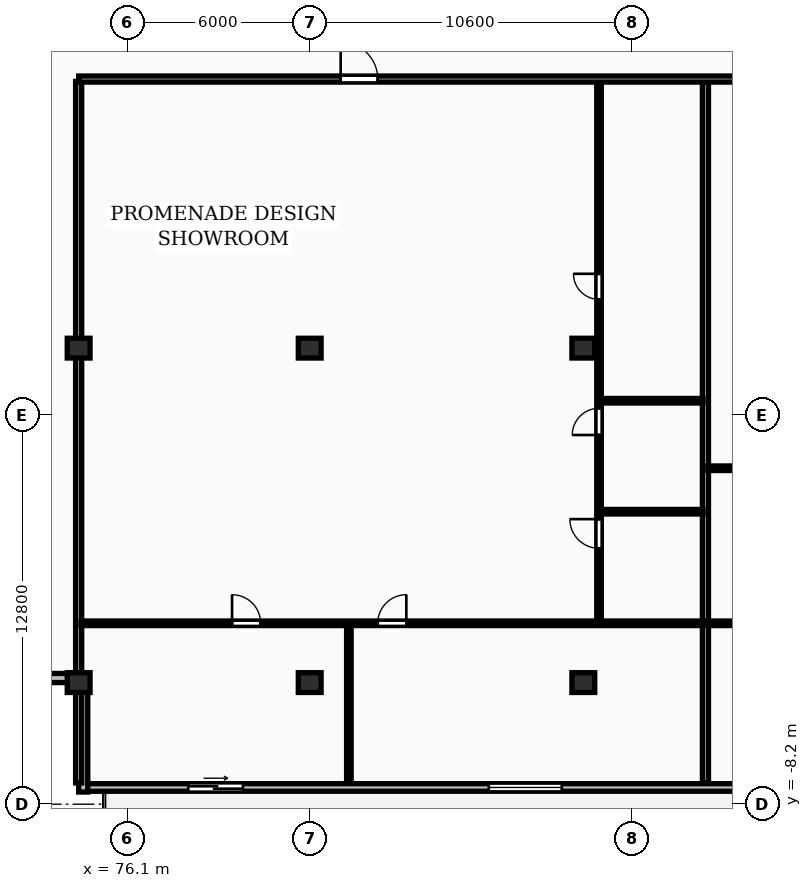
"""IFC4 building model, lengths in metres.
Left out: names, types, materials, properties, quantities, classifications, styles, units other than length and angle.
Written with IfcOpenShell. Run it as: python <this file> out.ifc"""

import sys

from ifc_helpers import new_model, si_unit, direction, frame, frame_2d, origin, origin_2d, place, context, subcontext, project, spatial, rectangle, extrude, element, fill, save


model = new_model("IFC4")
c1 = context("Model", 3, precision=1e-05, world=origin(), true_north=direction((0.0, 1.0)))
c2 = subcontext(c1, "Body", "Model", "MODEL_VIEW")
j1 = project(units=[si_unit("LENGTHUNIT", "METRE"), si_unit("PLANEANGLEUNIT", "RADIAN")], contexts=[c1])
p1 = place(None, origin())
s1 = spatial("IfcSite", under=j1, at=p1, CompositionType="ELEMENT")
p2 = place(p1, origin())
s2 = spatial("IfcBuilding", under=s1, at=p2, CompositionType="ELEMENT")
p3 = place(p2, frame((0.0, 0.0, 201.1)))
s3 = spatial("IfcBuildingStorey", under=s2, at=p3, CompositionType="ELEMENT", Elevation=201.1)
for number, where, z_axis, x_axis in (
    (1, (74.5, -4.2, 0.0), (0.0, 0.0, 1.0), (1.0, 0.0, 0.0)),
    (2, (74.5, 6.8, 0.0), (0.0, 0.0, 1.0), (1.0, 0.0, 0.0)),
    (3, (82.1, -4.2, 0.0), (0.0, 0.0, 1.0), (1.0, 0.0, 0.0)),
    (4, (82.1, 6.8, 0.0), (0.0, 0.0, 1.0), (1.0, 0.0, 0.0)),
    (5, (91.1, -4.2, 0.0), (0.0, 0.0, 1.0), (1.0, 0.0, 0.0)),
    (6, (91.1, 6.8, 0.0), (0.0, 0.0, 1.0), (1.0, 0.0, 0.0)),
):
    element("IfcColumn", number, at=place(p3, frame(where, z_axis=z_axis, x_axis=x_axis)), inside=s3, PredefinedType="COLUMN", context=c2, shape_type="SweptSolid", body=[
        extrude(rectangle(XDim=0.75, YDim=0.65, at=origin_2d()), origin(), (0.0, 0.0, 1.0), 3.25),
    ])
p4 = place(p3, frame((74.5, -7.65, 0.0), z_axis=(0.0, 0.0, 1.0), x_axis=(1.0, 0.0, 0.0)))
e7 = element("IfcWall", 7, at=p4, inside=s3, PredefinedType="STANDARD", context=c2, shape_type="SweptSolid", body=[
    extrude(rectangle(XDim=54.4, YDim=0.25, at=frame_2d((27.2, 0.0))), origin(), (0.0, 0.0, 1.0), 2.97),
])
p5 = place(p4, frame((3.604, 0.0, 0.0)))
e8 = element("IfcOpeningElement", 8, at=p5, cuts=e7, PredefinedType="OPENING", context=c2, shape_type="SweptSolid", body=[
    extrude(rectangle(XDim=1.8, YDim=2.2, at=frame_2d((0.9, 1.1))), frame((0.0, 0.135, 0.0), z_axis=(0.0, -1.0, 0.0), x_axis=(1.0, 0.0, 0.0)), (0.0, 0.0, 1.0), 0.27),
])
p6 = place(p4, frame((13.492, 0.0, 0.85)))
e9 = element("IfcOpeningElement", 9, at=p6, cuts=e7, PredefinedType="OPENING", context=c2, shape_type="SweptSolid", body=[
    extrude(rectangle(XDim=2.4, YDim=1.9, at=frame_2d((1.2, 0.95))), frame((0.0, 0.135, 0.0), z_axis=(0.0, -1.0, 0.0), x_axis=(1.0, 0.0, 0.0)), (0.0, 0.0, 1.0), 0.27),
])
p7 = place(p4, frame((28.655, 0.0, 0.85)))
e10 = element("IfcOpeningElement", 10, at=p7, cuts=e7, PredefinedType="OPENING", context=c2, shape_type="SweptSolid", body=[
    extrude(rectangle(XDim=2.4, YDim=1.9, at=frame_2d((1.2, 0.95))), frame((0.0, 0.135, 0.0), z_axis=(0.0, -1.0, 0.0), x_axis=(1.0, 0.0, 0.0)), (0.0, 0.0, 1.0), 0.27),
])
p8 = place(p4, frame((33.155, 0.0, 0.85)))
e11 = element("IfcOpeningElement", 11, at=p8, cuts=e7, PredefinedType="OPENING", context=c2, shape_type="SweptSolid", body=[
    extrude(rectangle(XDim=2.4, YDim=1.9, at=frame_2d((1.2, 0.95))), frame((0.0, 0.135, 0.0), z_axis=(0.0, -1.0, 0.0), x_axis=(1.0, 0.0, 0.0)), (0.0, 0.0, 1.0), 0.27),
])
p9 = place(p4, frame((23.208, 0.0, 0.0)))
e12 = element("IfcOpeningElement", 12, at=p9, cuts=e7, PredefinedType="OPENING", context=c2, shape_type="SweptSolid", body=[
    extrude(rectangle(XDim=1.8, YDim=2.2, at=frame_2d((0.9, 1.1))), frame((0.0, 0.135, 0.0), z_axis=(0.0, -1.0, 0.0), x_axis=(1.0, 0.0, 0.0)), (0.0, 0.0, 1.0), 0.27),
])
p10 = place(p4, frame((37.101, 0.0, 0.85)))
e13 = element("IfcOpeningElement", 13, at=p10, cuts=e7, PredefinedType="OPENING", context=c2, shape_type="SweptSolid", body=[
    extrude(rectangle(XDim=1.8, YDim=1.8, at=frame_2d((0.9, 0.9))), frame((0.0, 0.135, 0.0), z_axis=(0.0, -1.0, 0.0), x_axis=(1.0, 0.0, 0.0)), (0.0, 0.0, 1.0), 0.27),
])
p11 = place(p4, frame((44.471, 0.0, 0.0)))
e14 = element("IfcOpeningElement", 14, at=p11, cuts=e7, PredefinedType="OPENING", context=c2, shape_type="SweptSolid", body=[
    extrude(rectangle(XDim=1.8, YDim=2.2, at=frame_2d((0.9, 1.1))), frame((0.0, 0.135, 0.0), z_axis=(0.0, -1.0, 0.0), x_axis=(1.0, 0.0, 0.0)), (0.0, 0.0, 1.0), 0.27),
])
p12 = place(p4, frame((51.73, 0.0, 0.85)))
e15 = element("IfcOpeningElement", 15, at=p12, cuts=e7, PredefinedType="OPENING", context=c2, shape_type="SweptSolid", body=[
    extrude(rectangle(XDim=1.8, YDim=1.8, at=frame_2d((0.9, 0.9))), frame((0.0, 0.135, 0.0), z_axis=(0.0, -1.0, 0.0), x_axis=(1.0, 0.0, 0.0)), (0.0, 0.0, 1.0), 0.27),
])
for number, where, z_axis, x_axis in (
    (16, (70.9, -4.05, 0.0), (0.0, 0.0, 1.0), (1.0, 0.0, 0.0)),
    (17, (74.65, -4.2, 0.0), (0.0, 0.0, 1.0), (0.0, -1.0, 0.0)),
):
    element("IfcWall", number, at=place(p3, frame(where, z_axis=z_axis, x_axis=x_axis)), inside=s3, PredefinedType="STANDARD", context=c2, shape_type="SweptSolid", body=[
        extrude(rectangle(XDim=3.6, YDim=0.3, at=frame_2d((1.8, 0.0))), origin(), (0.0, 0.0, 1.0), 2.97),
    ])
p13 = place(p3, frame((74.5, -7.5, 0.0), z_axis=(0.0, 0.0, 1.0), x_axis=(0.0, 1.0, 0.0)))
e18 = element("IfcWall", 18, at=p13, inside=s3, PredefinedType="PARTITIONING", context=c2, shape_type="SweptSolid", body=[
    extrude(rectangle(XDim=23.07, YDim=0.2, at=frame_2d((11.535, 0.0))), origin(), (0.0, 0.0, 1.0), 2.2),
])
p14 = place(p3, frame((95.117, -7.5, 0.0), z_axis=(0.0, 0.0, 1.0), x_axis=(0.0, 1.0, 0.0)))
e19 = element("IfcWall", 19, at=p14, inside=s3, PredefinedType="PARTITIONING", context=c2, shape_type="SweptSolid", body=[
    extrude(rectangle(XDim=23.07, YDim=0.2, at=frame_2d((11.535, 0.0))), origin(), (0.0, 0.0, 1.0), 2.97),
])
for number, where, z_axis, x_axis in (
    (20, (91.677, 1.42, 0.0), (0.0, 0.0, 1.0), (1.0, 0.0, 0.0)),
    (21, (91.677, 5.07, 0.0), (0.0, 0.0, 1.0), (1.0, 0.0, 0.0)),
):
    element("IfcWall", number, at=place(p3, frame(where, z_axis=z_axis, x_axis=x_axis)), inside=s3, PredefinedType="PARTITIONING", context=c2, shape_type="SweptSolid", body=[
        extrude(rectangle(XDim=3.36, YDim=0.15, at=frame_2d((1.68, 0.0))), origin(), (0.0, 0.0, 1.0), 2.97),
    ])
p15 = place(p3, frame((91.617, -2.19, 0.0), z_axis=(0.0, 0.0, 1.0), x_axis=(0.0, 1.0, 0.0)))
e22 = element("IfcWall", 22, at=p15, inside=s3, PredefinedType="PARTITIONING", context=c2, shape_type="SweptSolid", body=[
    extrude(rectangle(XDim=17.78, YDim=0.15, at=frame_2d((8.89, 0.0))), origin(), (0.0, 0.0, 1.0), 2.97),
])
p16 = place(p15, frame((2.406, 0.0, 0.0)))
e23 = element("IfcOpeningElement", 23, at=p16, cuts=e22, PredefinedType="OPENING", context=c2, shape_type="SweptSolid", body=[
    extrude(rectangle(XDim=0.96, YDim=2.1, at=frame_2d((0.48, 1.05))), frame((0.0, 0.085, 0.0), z_axis=(0.0, -1.0, 0.0), x_axis=(1.0, 0.0, 0.0)), (0.0, 0.0, 1.0), 0.17),
])
p17 = place(p15, frame((6.133, 0.0, 0.0)))
e24 = element("IfcOpeningElement", 24, at=p17, cuts=e22, PredefinedType="OPENING", context=c2, shape_type="SweptSolid", body=[
    extrude(rectangle(XDim=0.88, YDim=2.06, at=frame_2d((0.44, 1.03))), frame((0.0, 0.085, 0.0), z_axis=(0.0, -1.0, 0.0), x_axis=(1.0, 0.0, 0.0)), (0.0, 0.0, 1.0), 0.17),
])
p18 = place(p15, frame((10.595, 0.0, 0.0)))
e25 = element("IfcOpeningElement", 25, at=p18, cuts=e22, PredefinedType="OPENING", context=c2, shape_type="SweptSolid", body=[
    extrude(rectangle(XDim=0.84, YDim=2.04, at=frame_2d((0.42, 1.02))), frame((0.0, 0.085, 0.0), z_axis=(0.0, -1.0, 0.0), x_axis=(1.0, 0.0, 0.0)), (0.0, 0.0, 1.0), 0.17),
])
p19 = place(p3, frame((83.388, -7.5, 0.0), z_axis=(0.0, 0.0, 1.0), x_axis=(0.0, 1.0, 0.0)))
e26 = element("IfcWall", 26, at=p19, inside=s3, PredefinedType="PARTITIONING", context=c2, shape_type="SweptSolid", body=[
    extrude(rectangle(XDim=5.17, YDim=0.15, at=frame_2d((2.585, 0.0))), origin(), (0.0, 0.0, 1.0), 2.97),
])
p20 = place(p3, frame((74.58, -2.25, 0.0), z_axis=(0.0, 0.0, 1.0), x_axis=(1.0, 0.0, 0.0)))
e27 = element("IfcWall", 27, at=p20, inside=s3, PredefinedType="PARTITIONING", context=c2, shape_type="SweptSolid", body=[
    extrude(rectangle(XDim=20.457, YDim=0.15, at=frame_2d((10.228, 0.0))), origin(), (0.0, 0.0, 1.0), 2.97),
])
p21 = place(p20, frame((4.966, 0.0, 0.0)))
e28 = element("IfcOpeningElement", 28, at=p21, cuts=e27, PredefinedType="OPENING", context=c2, shape_type="SweptSolid", body=[
    extrude(rectangle(XDim=0.94, YDim=2.1, at=frame_2d((0.47, 1.05))), frame((0.0, 0.085, 0.0), z_axis=(0.0, -1.0, 0.0), x_axis=(1.0, 0.0, 0.0)), (0.0, 0.0, 1.0), 0.17),
])
p22 = place(p20, frame((9.758, 0.0, 0.0)))
e29 = element("IfcOpeningElement", 29, at=p22, cuts=e27, PredefinedType="OPENING", context=c2, shape_type="SweptSolid", body=[
    extrude(rectangle(XDim=0.94, YDim=2.1, at=frame_2d((0.47, 1.05))), frame((0.0, 0.085, 0.0), z_axis=(0.0, -1.0, 0.0), x_axis=(1.0, 0.0, 0.0)), (0.0, 0.0, 1.0), 0.17),
])
p23 = place(p3, frame((95.197, 2.85, 0.0), z_axis=(0.0, 0.0, 1.0), x_axis=(1.0, 0.0, 0.0)))
e30 = element("IfcWall", 30, at=p23, inside=s3, PredefinedType="PARTITIONING", context=c2, shape_type="SweptSolid", body=[
    extrude(rectangle(XDim=18.865, YDim=0.15, at=frame_2d((9.433, 0.0))), origin(), (0.0, 0.0, 1.0), 2.97),
])
p24 = place(p23, frame((2.72, 0.0, 0.0)))
e31 = element("IfcOpeningElement", 31, at=p24, cuts=e30, PredefinedType="OPENING", context=c2, shape_type="SweptSolid", body=[
    extrude(rectangle(XDim=0.92, YDim=2.08, at=frame_2d((0.46, 1.04))), frame((0.0, 0.085, 0.0), z_axis=(0.0, -1.0, 0.0), x_axis=(1.0, 0.0, 0.0)), (0.0, 0.0, 1.0), 0.17),
])
p25 = place(p3, frame((95.197, -2.25, 0.0), z_axis=(0.0, 0.0, 1.0), x_axis=(1.0, 0.0, 0.0)))
e32 = element("IfcWall", 32, at=p25, inside=s3, PredefinedType="PARTITIONING", context=c2, shape_type="SweptSolid", body=[
    extrude(rectangle(XDim=15.783, YDim=0.15, at=frame_2d((7.892, 0.0))), origin(), (0.0, 0.0, 1.0), 2.97),
])
p26 = place(p25, frame((2.387, 0.0, 0.0)))
e33 = element("IfcOpeningElement", 33, at=p26, cuts=e32, PredefinedType="OPENING", context=c2, shape_type="SweptSolid", body=[
    extrude(rectangle(XDim=0.94, YDim=2.1, at=frame_2d((0.47, 1.05))), frame((0.0, 0.085, 0.0), z_axis=(0.0, -1.0, 0.0), x_axis=(1.0, 0.0, 0.0)), (0.0, 0.0, 1.0), 0.17),
])
p27 = place(p25, frame((7.452, 0.0, 0.0)))
e34 = element("IfcOpeningElement", 34, at=p27, cuts=e32, PredefinedType="OPENING", context=c2, shape_type="SweptSolid", body=[
    extrude(rectangle(XDim=0.88, YDim=2.06, at=frame_2d((0.44, 1.03))), frame((0.0, 0.085, 0.0), z_axis=(0.0, -1.0, 0.0), x_axis=(1.0, 0.0, 0.0)), (0.0, 0.0, 1.0), 0.17),
])
p28 = place(p25, frame((11.753, 0.0, 0.0)))
e35 = element("IfcOpeningElement", 35, at=p28, cuts=e32, PredefinedType="OPENING", context=c2, shape_type="SweptSolid", body=[
    extrude(rectangle(XDim=0.88, YDim=2.06, at=frame_2d((0.44, 1.03))), frame((0.0, 0.085, 0.0), z_axis=(0.0, -1.0, 0.0), x_axis=(1.0, 0.0, 0.0)), (0.0, 0.0, 1.0), 0.17),
])
p29 = place(p3, frame((74.5, 15.65, 0.0), z_axis=(0.0, 0.0, 1.0), x_axis=(1.0, 0.0, 0.0)))
e36 = element("IfcWall", 36, at=p29, inside=s3, PredefinedType="PARTITIONING", context=c2, shape_type="SweptSolid", body=[
    extrude(rectangle(XDim=54.4, YDim=0.2, at=frame_2d((27.2, 0.0))), origin(), (0.0, 0.0, 1.0), 2.97),
])
p30 = place(p29, frame((8.618, 0.0, 0.0)))
e37 = element("IfcOpeningElement", 37, at=p30, cuts=e36, PredefinedType="OPENING", context=c2, shape_type="SweptSolid", body=[
    extrude(rectangle(XDim=1.22, YDim=2.18, at=frame_2d((0.61, 1.09))), frame((0.0, 0.11, 0.0), z_axis=(0.0, -1.0, 0.0), x_axis=(1.0, 0.0, 0.0)), (0.0, 0.0, 1.0), 0.22),
])
p31 = place(p29, frame((22.662, 0.0, 0.0)))
e38 = element("IfcOpeningElement", 38, at=p31, cuts=e36, PredefinedType="OPENING", context=c2, shape_type="SweptSolid", body=[
    extrude(rectangle(XDim=0.95, YDim=2.15, at=frame_2d((0.475, 1.075))), frame((0.0, 0.11, 0.0), z_axis=(0.0, -1.0, 0.0), x_axis=(1.0, 0.0, 0.0)), (0.0, 0.0, 1.0), 0.22),
])
p32 = place(p29, frame((41.687, 0.0, 0.0)))
e39 = element("IfcOpeningElement", 39, at=p32, cuts=e36, PredefinedType="OPENING", context=c2, shape_type="SweptSolid", body=[
    extrude(rectangle(XDim=0.95, YDim=2.15, at=frame_2d((0.475, 1.075))), frame((0.0, 0.11, 0.0), z_axis=(0.0, -1.0, 0.0), x_axis=(1.0, 0.0, 0.0)), (0.0, 0.0, 1.0), 0.22),
])
p33 = place(p5, origin())
e40 = element("IfcDoor", 40, at=p33, inside=s3, OperationType="SLIDING_TO_RIGHT", PredefinedType="DOOR", context=c2, shape_type="SweptSolid", body=[
    extrude(rectangle(XDim=1.8, YDim=2.2, at=frame_2d((0.9, 1.1))), frame((0.0, 0.025, 0.0), z_axis=(0.0, -1.0, 0.0), x_axis=(1.0, 0.0, 0.0)), (0.0, 0.0, 1.0), 0.05),
])
fill(e8, e40)
p34 = place(p6, origin())
e41 = element("IfcWindow", 41, at=p34, inside=s3, PartitioningType="DOUBLE_PANEL_VERTICAL", PredefinedType="WINDOW", context=c2, shape_type="SweptSolid", body=[
    extrude(rectangle(XDim=2.4, YDim=1.9, at=frame_2d((1.2, 0.95))), frame((0.0, 0.03, 0.0), z_axis=(0.0, -1.0, 0.0), x_axis=(1.0, 0.0, 0.0)), (0.0, 0.0, 1.0), 0.06),
])
fill(e9, e41)
p35 = place(p16, origin())
e42 = element("IfcDoor", 42, at=p35, inside=s3, OperationType="SINGLE_SWING_RIGHT", PredefinedType="DOOR", context=c2, shape_type="SweptSolid", body=[
    extrude(rectangle(XDim=0.96, YDim=2.1, at=frame_2d((0.48, 1.05))), frame((0.0, 0.025, 0.0), z_axis=(0.0, -1.0, 0.0), x_axis=(1.0, 0.0, 0.0)), (0.0, 0.0, 1.0), 0.05),
])
fill(e23, e42)
p36 = place(p17, origin())
e43 = element("IfcDoor", 43, at=p36, inside=s3, OperationType="SINGLE_SWING_LEFT", PredefinedType="DOOR", context=c2, shape_type="SweptSolid", body=[
    extrude(rectangle(XDim=0.88, YDim=2.06, at=frame_2d((0.44, 1.03))), frame((0.0, 0.025, 0.0), z_axis=(0.0, -1.0, 0.0), x_axis=(1.0, 0.0, 0.0)), (0.0, 0.0, 1.0), 0.05),
])
fill(e24, e43)
p37 = place(p18, origin())
e44 = element("IfcDoor", 44, at=p37, inside=s3, OperationType="SINGLE_SWING_RIGHT", PredefinedType="DOOR", context=c2, shape_type="SweptSolid", body=[
    extrude(rectangle(XDim=0.84, YDim=2.04, at=frame_2d((0.42, 1.02))), frame((0.0, 0.025, 0.0), z_axis=(0.0, -1.0, 0.0), x_axis=(1.0, 0.0, 0.0)), (0.0, 0.0, 1.0), 0.05),
])
fill(e25, e44)
p38 = place(p21, origin())
e45 = element("IfcDoor", 45, at=p38, inside=s3, OperationType="SINGLE_SWING_LEFT", PredefinedType="DOOR", context=c2, shape_type="SweptSolid", body=[
    extrude(rectangle(XDim=0.94, YDim=2.1, at=frame_2d((0.47, 1.05))), frame((0.0, 0.025, 0.0), z_axis=(0.0, -1.0, 0.0), x_axis=(1.0, 0.0, 0.0)), (0.0, 0.0, 1.0), 0.05),
])
fill(e28, e45)
p39 = place(p22, origin())
e46 = element("IfcDoor", 46, at=p39, inside=s3, OperationType="SINGLE_SWING_RIGHT", PredefinedType="DOOR", context=c2, shape_type="SweptSolid", body=[
    extrude(rectangle(XDim=0.94, YDim=2.1, at=frame_2d((0.47, 1.05))), frame((0.0, 0.025, 0.0), z_axis=(0.0, -1.0, 0.0), x_axis=(1.0, 0.0, 0.0)), (0.0, 0.0, 1.0), 0.05),
])
fill(e29, e46)
p40 = place(p30, origin())
e47 = element("IfcDoor", 47, at=p40, inside=s3, OperationType="SINGLE_SWING_LEFT", PredefinedType="DOOR", context=c2, shape_type="SweptSolid", body=[
    extrude(rectangle(XDim=1.22, YDim=2.18, at=frame_2d((0.61, 1.09))), frame((0.0, 0.025, 0.0), z_axis=(0.0, -1.0, 0.0), x_axis=(1.0, 0.0, 0.0)), (0.0, 0.0, 1.0), 0.05),
])
fill(e37, e47)
save(model, sys.argv[1])
